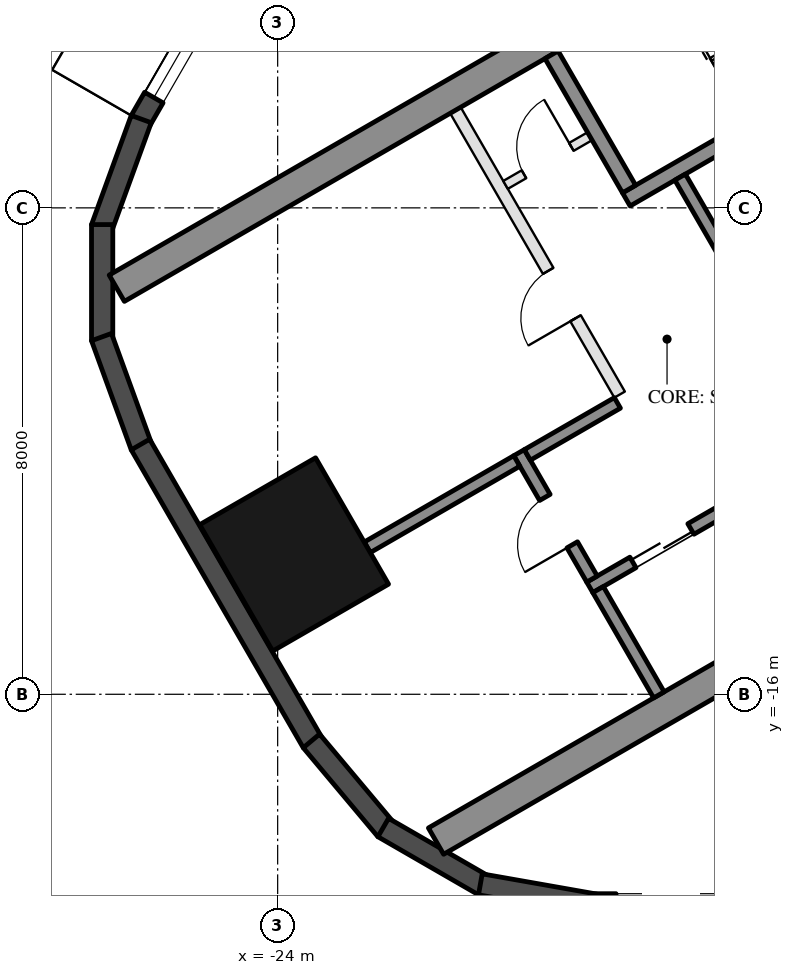
"""IFC4 building model, lengths in metres.
Left out: names, types, materials, properties, quantities, classifications, styles, units other than length and angle.
Written with IfcOpenShell. Run it as: python <this file> out.ifc"""

import sys

from ifc_helpers import new_model, si_unit, direction, frame, frame_2d, origin, origin_2d, place, context, subcontext, project, spatial, rectangle, hollow_rectangle, extrude, element, fill, save


model = new_model("IFC4")
c1 = context("Model", 3, precision=1e-05, world=origin(), true_north=direction((0.0, 1.0)))
c2 = subcontext(c1, "Body", "Model", "MODEL_VIEW")
j1 = project(units=[si_unit("LENGTHUNIT", "METRE"), si_unit("PLANEANGLEUNIT", "RADIAN")], contexts=[c1])
p1 = place(None, origin())
s1 = spatial("IfcSite", under=j1, at=p1, CompositionType="ELEMENT")
p2 = place(p1, origin())
s2 = spatial("IfcBuilding", under=s1, at=p2, CompositionType="ELEMENT")
p3 = place(p2, frame((0.0, 0.0, 161.4)))
s3 = spatial("IfcBuildingStorey", under=s2, at=p3, CompositionType="ELEMENT", Elevation=161.4)
p4 = place(p3, frame((-23.729, -13.7, 0.0), z_axis=(0.0, 0.0, 1.0), x_axis=(-0.5, 0.866025403784, 0.0)))
e1 = element("IfcColumn", 1, at=p4, inside=s3, PredefinedType="COLUMN", context=c2, shape_type="SweptSolid", body=[
    extrude(hollow_rectangle(XDim=2.4, YDim=2.2, WallThickness=0.06, at=origin_2d()), origin(), (0.0, 0.0, 1.0), 3.7),
])
p5 = place(p3, frame((-24.299, -3.176, 0.0), z_axis=(0.0, 0.0, 1.0), x_axis=(-0.500028278809, -0.866009076391, 0.0)))
e2 = element("IfcWall", 2, at=p5, inside=s3, PredefinedType="SOLIDWALL", context=c2, shape_type="SweptSolid", body=[
    extrude(rectangle(XDim=3.916, YDim=0.35, at=frame_2d((1.958, 0.0))), origin(), (0.0, 0.0, 1.0), 3.55),
])
p6 = place(p5, frame((1.675, 0.0, 0.3)))
e3 = element("IfcOpeningElement", 3, at=p6, cuts=e2, PredefinedType="OPENING", context=c2, shape_type="SweptSolid", body=[
    extrude(rectangle(XDim=1.8, YDim=2.65, at=frame_2d((0.9, 1.325))), frame((0.0, 0.185, 0.0), z_axis=(0.0, -1.0, 0.0), x_axis=(1.0, 0.0, 0.0)), (0.0, 0.0, 1.0), 0.37),
])
for number, where, z_axis, x_axis in (
    (4, (-26.244, -6.54, 0.0), (0.0, 0.0, 1.0), (-0.342, -0.94, 0.0)),
    (5, (-26.886, -8.275, 0.0), (0.0, 0.0, 1.0), (0.0, -1.0, 0.0)),
    (6, (-26.897, -10.125, 0.0), (0.0, 0.0, 1.0), (0.342, -0.94, 0.0)),
):
    element("IfcWall", number, at=place(p3, frame(where, z_axis=z_axis, x_axis=x_axis)), inside=s3, PredefinedType="SOLIDWALL", context=c2, shape_type="SweptSolid", body=[
        extrude(rectangle(XDim=1.91, YDim=0.35, at=frame_2d((0.955, 0.0))), origin(), (0.0, 0.0, 1.0), 3.55),
    ])
p7 = place(p3, frame((-26.257, -11.893, 0.0), z_axis=(0.0, 0.0, 1.0), x_axis=(0.500018773155, -0.866014564827, 0.0)))
e7 = element("IfcWall", 7, at=p7, inside=s3, PredefinedType="SOLIDWALL", context=c2, shape_type="SweptSolid", body=[
    extrude(rectangle(XDim=5.658, YDim=0.35, at=frame_2d((2.829, 0.0))), origin(), (0.0, 0.0, 1.0), 3.55),
])
for number, where, z_axis, x_axis in (
    (8, (-23.445, -16.768, 0.0), (0.0, 0.0, 1.0), (0.643, -0.766, 0.0)),
    (9, (-22.264, -18.192, 0.0), (0.0, 0.0, 1.0), (0.866, -0.5, 0.0)),
):
    element("IfcWall", number, at=place(p3, frame(where, z_axis=z_axis, x_axis=x_axis)), inside=s3, PredefinedType="SOLIDWALL", context=c2, shape_type="SweptSolid", body=[
        extrude(rectangle(XDim=1.91, YDim=0.35, at=frame_2d((0.955, 0.0))), origin(), (0.0, 0.0, 1.0), 3.55),
    ])
p8 = place(p3, frame((-20.667, -19.126, 0.0), z_axis=(0.0, 0.0, 1.0), x_axis=(0.984798995425, -0.173697837091, 0.0)))
e10 = element("IfcWall", 10, at=p8, inside=s3, PredefinedType="SOLIDWALL", context=c2, shape_type="SweptSolid", body=[
    extrude(rectangle(XDim=1.91, YDim=0.35, at=frame_2d((0.955, 0.0))), origin(), (0.0, 0.0, 1.0), 3.55),
])
p9 = place(p3, frame((-18.816, -19.455, 0.0), z_axis=(0.0, 0.0, 1.0), x_axis=(1.0, 0.0, 0.0)))
e11 = element("IfcWall", 11, at=p9, inside=s3, PredefinedType="SOLIDWALL", context=c2, shape_type="SweptSolid", body=[
    extrude(rectangle(XDim=11.816, YDim=0.35, at=frame_2d((5.908, 0.0))), origin(), (0.0, 0.0, 1.0), 3.55),
])
p10 = place(p9, frame((0.381, 0.0, 0.3)))
e12 = element("IfcOpeningElement", 12, at=p10, cuts=e11, PredefinedType="OPENING", context=c2, shape_type="SweptSolid", body=[
    extrude(rectangle(XDim=1.8, YDim=2.65, at=frame_2d((0.9, 1.325))), frame((0.0, 0.185, 0.0), z_axis=(0.0, -1.0, 0.0), x_axis=(1.0, 0.0, 0.0)), (0.0, 0.0, 1.0), 0.37),
])
p11 = place(p9, frame((7.74, 0.0, 0.0)))
e13 = element("IfcOpeningElement", 13, at=p11, cuts=e11, PredefinedType="OPENING", context=c2, shape_type="SweptSolid", body=[
    extrude(rectangle(XDim=2.4, YDim=2.4, at=frame_2d((1.2, 1.2))), frame((0.0, 0.185, 0.0), z_axis=(0.0, -1.0, 0.0), x_axis=(1.0, 0.0, 0.0)), (0.0, 0.0, 1.0), 0.37),
])
p12 = place(p9, frame((3.791, 0.0, 0.3)))
e14 = element("IfcOpeningElement", 14, at=p12, cuts=e11, PredefinedType="OPENING", context=c2, shape_type="SweptSolid", body=[
    extrude(rectangle(XDim=1.6, YDim=2.65, at=frame_2d((0.8, 1.325))), frame((0.0, 0.185, 0.0), z_axis=(0.0, -1.0, 0.0), x_axis=(1.0, 0.0, 0.0)), (0.0, 0.0, 1.0), 0.37),
])
p13 = place(p9, frame((5.691, 0.0, 0.3)))
e15 = element("IfcOpeningElement", 15, at=p13, cuts=e11, PredefinedType="OPENING", context=c2, shape_type="SweptSolid", body=[
    extrude(rectangle(XDim=1.6, YDim=2.65, at=frame_2d((0.8, 1.325))), frame((0.0, 0.185, 0.0), z_axis=(0.0, -1.0, 0.0), x_axis=(1.0, 0.0, 0.0)), (0.0, 0.0, 1.0), 0.37),
])
for number, where, z_axis, x_axis in (
    (16, (-13.797, -1.903, 0.0), (0.0, 0.0, 1.0), (-0.866, -0.5, 0.0)),
    (17, (-8.547, -10.997, 0.0), (0.0, 0.0, 1.0), (-0.866, -0.5, 0.0)),
):
    element("IfcWall", number, at=place(p3, frame(where, z_axis=z_axis, x_axis=x_axis)), inside=s3, PredefinedType="SHEAR", context=c2, shape_type="SweptSolid", body=[
        extrude(rectangle(XDim=14.837, YDim=0.5, at=frame_2d((7.418, 0.0))), origin(), (0.0, 0.0, 1.0), 3.5),
    ])
p14 = place(p3, frame((-12.681, -4.636, 0.0), z_axis=(0.0, 0.0, 1.0), x_axis=(-0.866021702275, -0.500006411147, 0.0)))
e18 = element("IfcWall", 18, at=p14, inside=s3, PredefinedType="SHEAR", context=c2, shape_type="SweptSolid", body=[
    extrude(rectangle(XDim=6.45, YDim=0.25, at=frame_2d((3.225, 0.0))), origin(), (0.0, 0.0, 1.0), 3.5),
])
p15 = place(p14, frame((0.3, 0.0, 0.0)))
e19 = element("IfcOpeningElement", 19, at=p15, cuts=e18, PredefinedType="OPENING", context=c2, shape_type="SweptSolid", body=[
    extrude(rectangle(XDim=1.0, YDim=2.1, at=frame_2d((0.5, 1.05))), frame((0.0, 0.135, 0.0), z_axis=(0.0, -1.0, 0.0), x_axis=(1.0, 0.0, 0.0)), (0.0, 0.0, 1.0), 0.27),
])
p16 = place(p3, frame((-19.496, -5.482, 0.0), z_axis=(0.0, 0.0, 1.0), x_axis=(0.499990435942, -0.866030925526, 0.0)))
e20 = element("IfcWall", 20, at=p16, inside=s3, PredefinedType="SHEAR", context=c2, shape_type="SweptSolid", body=[
    extrude(rectangle(XDim=2.55, YDim=0.25, at=frame_2d((1.275, 0.0))), origin(), (0.0, 0.0, 1.0), 3.5),
])
p17 = place(p3, frame((-17.381, -7.495, 0.0), z_axis=(0.0, 0.0, 1.0), x_axis=(0.500011755427, -0.866018616679, 0.0)))
e21 = element("IfcWall", 21, at=p17, inside=s3, PredefinedType="SHEAR", context=c2, shape_type="SweptSolid", body=[
    extrude(rectangle(XDim=2.8, YDim=0.2, at=frame_2d((1.4, 0.0))), origin(), (0.0, 0.0, 1.0), 3.5),
])
p18 = place(p3, frame((-10.068, -9.162, 0.0), z_axis=(0.0, 0.0, 1.0), x_axis=(-0.866032725843, -0.499987317609, 0.0)))
e22 = element("IfcWall", 22, at=p18, inside=s3, PredefinedType="SHEAR", context=c2, shape_type="SweptSolid", body=[
    extrude(rectangle(XDim=10.16, YDim=0.2, at=frame_2d((5.08, 0.0))), origin(), (0.0, 0.0, 1.0), 3.5),
])
p19 = place(p18, frame((0.62, 0.0, 0.0)))
e23 = element("IfcOpeningElement", 23, at=p19, cuts=e22, PredefinedType="OPENING", context=c2, shape_type="SweptSolid", body=[
    extrude(rectangle(XDim=1.1, YDim=2.1, at=frame_2d((0.55, 1.05))), frame((0.0, 0.11, 0.0), z_axis=(0.0, -1.0, 0.0), x_axis=(1.0, 0.0, 0.0)), (0.0, 0.0, 1.0), 0.22),
])
p20 = place(p18, frame((3.16, 0.0, 0.0)))
e24 = element("IfcOpeningElement", 24, at=p20, cuts=e22, PredefinedType="OPENING", context=c2, shape_type="SweptSolid", body=[
    extrude(rectangle(XDim=1.1, YDim=2.1, at=frame_2d((0.55, 1.05))), frame((0.0, 0.11, 0.0), z_axis=(0.0, -1.0, 0.0), x_axis=(1.0, 0.0, 0.0)), (0.0, 0.0, 1.0), 0.22),
])
p21 = place(p18, frame((5.7, 0.0, 0.0)))
e25 = element("IfcOpeningElement", 25, at=p21, cuts=e22, PredefinedType="OPENING", context=c2, shape_type="SweptSolid", body=[
    extrude(rectangle(XDim=1.1, YDim=2.1, at=frame_2d((0.55, 1.05))), frame((0.0, 0.11, 0.0), z_axis=(0.0, -1.0, 0.0), x_axis=(1.0, 0.0, 0.0)), (0.0, 0.0, 1.0), 0.22),
])
p22 = place(p18, frame((8.24, 0.0, 0.0)))
e26 = element("IfcOpeningElement", 26, at=p22, cuts=e22, PredefinedType="OPENING", context=c2, shape_type="SweptSolid", body=[
    extrude(rectangle(XDim=1.1, YDim=2.1, at=frame_2d((0.55, 1.05))), frame((0.0, 0.11, 0.0), z_axis=(0.0, -1.0, 0.0), x_axis=(1.0, 0.0, 0.0)), (0.0, 0.0, 1.0), 0.22),
])
p23 = place(p3, frame((-20.031, -12.026, 0.0), z_axis=(0.0, 0.0, 1.0), x_axis=(0.500033551112, -0.866006032174, 0.0)))
e27 = element("IfcWall", 27, at=p23, inside=s3, PredefinedType="SHEAR", context=c2, shape_type="SweptSolid", body=[
    extrude(rectangle(XDim=2.4, YDim=0.2, at=frame_2d((1.2, 0.0))), origin(), (0.0, 0.0, 1.0), 3.5),
])
p24 = place(p23, frame((0.85, 0.0, 0.0)))
e28 = element("IfcOpeningElement", 28, at=p24, cuts=e27, PredefinedType="OPENING", context=c2, shape_type="SweptSolid", body=[
    extrude(rectangle(XDim=0.9, YDim=2.1, at=frame_2d((0.45, 1.05))), frame((0.0, 0.11, 0.0), z_axis=(0.0, -1.0, 0.0), x_axis=(1.0, 0.0, 0.0)), (0.0, 0.0, 1.0), 0.22),
])
p25 = place(p3, frame((-18.413, -11.208, 0.0), z_axis=(0.0, 0.0, 1.0), x_axis=(-0.866038183914, -0.499977863513, 0.0)))
e29 = element("IfcWall", 29, at=p25, inside=s3, PredefinedType="SHEAR", context=c2, shape_type="SweptSolid", body=[
    extrude(rectangle(XDim=1.71, YDim=0.2, at=frame_2d((0.855, 0.0))), origin(), (0.0, 0.0, 1.0), 3.5),
])
p26 = place(p3, frame((-18.73, -14.278, 0.0), z_axis=(0.0, 0.0, 1.0), x_axis=(0.50002537861, -0.866010750942, 0.0)))
e30 = element("IfcWall", 30, at=p26, inside=s3, PredefinedType="SHEAR", context=c2, shape_type="SweptSolid", body=[
    extrude(rectangle(XDim=2.0, YDim=0.2, at=frame_2d((1.0, 0.0))), origin(), (0.0, 0.0, 1.0), 3.5),
])
p27 = place(p3, frame((-20.067, -12.163, 0.0), z_axis=(0.0, 0.0, 1.0), x_axis=(-0.866055327414, -0.49994816717, 0.0)))
e31 = element("IfcWall", 31, at=p27, inside=s3, PredefinedType="SHEAR", context=c2, shape_type="SweptSolid", body=[
    extrude(rectangle(XDim=2.84, YDim=0.2, at=frame_2d((1.42, 0.0))), origin(), (0.0, 0.0, 1.0), 3.5),
])
p28 = place(p3, frame((-21.076, -6.395, 0.0), z_axis=(0.0, 0.0, 1.0), x_axis=(0.50001468107, -0.866016927499, 0.0)))
e32 = element("IfcWall", 32, at=p28, inside=s3, PredefinedType="PARTITIONING", context=c2, shape_type="SweptSolid", body=[
    extrude(rectangle(XDim=5.4, YDim=0.2, at=frame_2d((2.7, 0.0))), origin(), (0.0, 0.0, 1.0), 3.5),
])
p29 = place(p28, frame((3.05, 0.0, 0.0)))
e33 = element("IfcOpeningElement", 33, at=p29, cuts=e32, PredefinedType="OPENING", context=c2, shape_type="SweptSolid", body=[
    extrude(rectangle(XDim=0.9, YDim=2.1, at=frame_2d((0.45, 1.05))), frame((0.0, 0.11, 0.0), z_axis=(0.0, -1.0, 0.0), x_axis=(1.0, 0.0, 0.0)), (0.0, 0.0, 1.0), 0.22),
])
p30 = place(p3, frame((-18.866, -6.822, 0.0), z_axis=(0.0, 0.0, 1.0), x_axis=(-0.866028054938, -0.499995408039, 0.0)))
e34 = element("IfcWall", 34, at=p30, inside=s3, PredefinedType="PARTITIONING", context=c2, shape_type="SweptSolid", body=[
    extrude(rectangle(XDim=1.6, YDim=0.15, at=frame_2d((0.8, 0.0))), origin(), (0.0, 0.0, 1.0), 3.5),
])
p31 = place(p30, frame((0.35, 0.0, 0.0)))
e35 = element("IfcOpeningElement", 35, at=p31, cuts=e34, PredefinedType="OPENING", context=c2, shape_type="SweptSolid", body=[
    extrude(rectangle(XDim=0.9, YDim=2.1, at=frame_2d((0.45, 1.05))), frame((0.0, 0.085, 0.0), z_axis=(0.0, -1.0, 0.0), x_axis=(1.0, 0.0, 0.0)), (0.0, 0.0, 1.0), 0.17),
])
p32 = place(p6, origin())
e36 = element("IfcWindow", 36, at=p32, inside=s3, PartitioningType="SINGLE_PANEL", PredefinedType="WINDOW", context=c2, shape_type="SweptSolid", body=[
    extrude(rectangle(XDim=1.8, YDim=2.65, at=frame_2d((0.9, 1.325))), frame((0.0, 0.03, 0.0), z_axis=(0.0, -1.0, 0.0), x_axis=(1.0, 0.0, 0.0)), (0.0, 0.0, 1.0), 0.06),
])
fill(e3, e36)
p33 = place(p31, frame((0.9, 0.0, 0.0), z_axis=(0.0, 0.0, 1.0), x_axis=(-1.0, 0.0, 0.0)))
e37 = element("IfcDoor", 37, at=p33, inside=s3, OperationType="SINGLE_SWING_RIGHT", PredefinedType="DOOR", context=c2, shape_type="SweptSolid", body=[
    extrude(rectangle(XDim=0.9, YDim=2.1, at=frame_2d((0.45, 1.05))), frame((0.0, 0.025, 0.0), z_axis=(0.0, -1.0, 0.0), x_axis=(1.0, 0.0, 0.0)), (0.0, 0.0, 1.0), 0.05),
])
fill(e35, e37)
p34 = place(p22, origin())
e38 = element("IfcDoor", 38, at=p34, inside=s3, OperationType="DOUBLE_DOOR_SLIDING", PredefinedType="DOOR", context=c2, shape_type="SweptSolid", body=[
    extrude(rectangle(XDim=1.1, YDim=2.1, at=frame_2d((0.55, 1.05))), frame((0.0, 0.025, 0.0), z_axis=(0.0, -1.0, 0.0), x_axis=(1.0, 0.0, 0.0)), (0.0, 0.0, 1.0), 0.05),
])
fill(e26, e38)
p35 = place(p24, frame((0.9, 0.0, 0.0), z_axis=(0.0, 0.0, 1.0), x_axis=(-1.0, 0.0, 0.0)))
e39 = element("IfcDoor", 39, at=p35, inside=s3, OperationType="SINGLE_SWING_LEFT", PredefinedType="DOOR", context=c2, shape_type="SweptSolid", body=[
    extrude(rectangle(XDim=0.9, YDim=2.1, at=frame_2d((0.45, 1.05))), frame((0.0, 0.025, 0.0), z_axis=(0.0, -1.0, 0.0), x_axis=(1.0, 0.0, 0.0)), (0.0, 0.0, 1.0), 0.05),
])
fill(e28, e39)
p36 = place(p29, frame((0.9, 0.0, 0.0), z_axis=(0.0, 0.0, 1.0), x_axis=(-1.0, 0.0, 0.0)))
e40 = element("IfcDoor", 40, at=p36, inside=s3, OperationType="SINGLE_SWING_LEFT", PredefinedType="DOOR", context=c2, shape_type="SweptSolid", body=[
    extrude(rectangle(XDim=0.9, YDim=2.1, at=frame_2d((0.45, 1.05))), frame((0.0, 0.025, 0.0), z_axis=(0.0, -1.0, 0.0), x_axis=(1.0, 0.0, 0.0)), (0.0, 0.0, 1.0), 0.05),
])
fill(e33, e40)
save(model, sys.argv[1])
